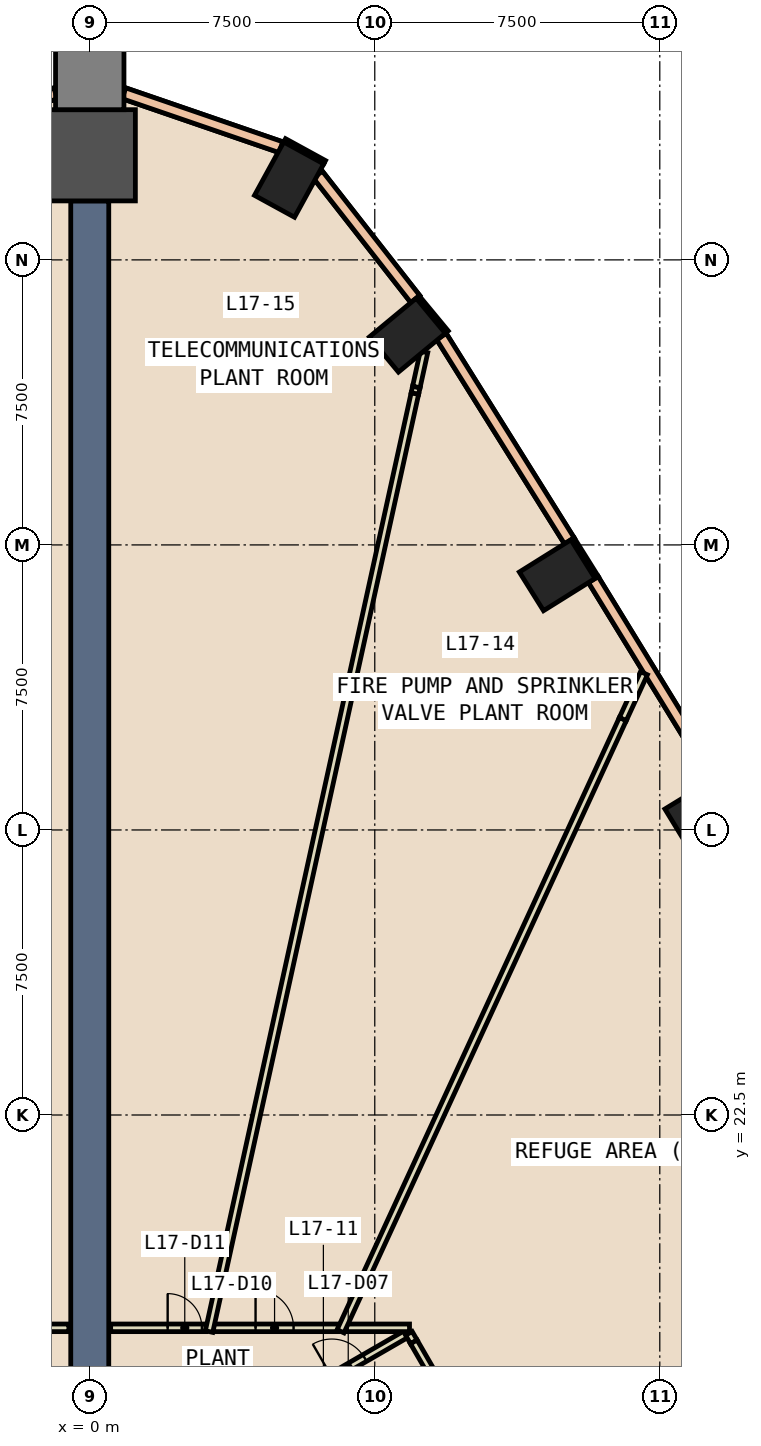
"""IFC4 building model, lengths in metres.
Left out: names, types, materials, properties, quantities, classifications, styles, units other than length and angle.
Written with IfcOpenShell. Run it as: python <this file> out.ifc"""

import sys

from ifc_helpers import new_model, si_unit, direction, frame, frame_2d, origin, origin_2d, place, context, subcontext, project, spatial, rectangle, extrude, element, fill, save


model = new_model("IFC4")
c1 = context("Model", 3, precision=1e-05, world=origin(), true_north=direction((0.0, 1.0)))
c2 = subcontext(c1, "Body", "Model", "MODEL_VIEW")
j1 = project(units=[si_unit("LENGTHUNIT", "METRE"), si_unit("PLANEANGLEUNIT", "RADIAN")], contexts=[c1])
p1 = place(None, origin())
s1 = spatial("IfcSite", under=j1, at=p1, CompositionType="ELEMENT")
p2 = place(p1, origin())
s2 = spatial("IfcBuilding", under=s1, at=p2, CompositionType="ELEMENT")
p3 = place(p2, frame((0.0, 0.0, 81.2)))
s3 = spatial("IfcBuildingStorey", under=s2, at=p3, CompositionType="ELEMENT", Elevation=81.2)
for number, where, z_axis, x_axis in (
    (1, (16.13, 30.457, -0.6), (0.0, 0.0, 1.0), (-0.522, 0.853, 0.0)),
    (2, (12.301, 36.702, -0.6), (0.0, 0.0, 1.0), (-0.53, 0.848, 0.0)),
    (3, (8.357, 43.02, -0.6), (0.0, 0.0, 1.0), (-0.638, 0.77, 0.0)),
    (4, (5.246, 47.112, -0.6), (0.0, 0.0, 1.0), (-0.877, 0.48, 0.0)),
):
    element("IfcColumn", number, at=place(p3, frame(where, z_axis=z_axis, x_axis=x_axis)), inside=s3, PredefinedType="COLUMN", context=c2, shape_type="SweptSolid", body=[
        extrude(rectangle(XDim=1.2, YDim=1.6, at=origin_2d()), origin(), (0.0, 0.0, 1.0), 5.4),
    ])
p4 = place(p3, frame((0.0, 47.752, -0.6), z_axis=(0.0, 0.0, 1.0), x_axis=(0.0, 1.0, 0.0)))
e5 = element("IfcColumn", 5, at=p4, inside=s3, PredefinedType="COLUMN", context=c2, shape_type="SweptSolid", body=[
    extrude(rectangle(XDim=2.4, YDim=2.4, at=origin_2d()), origin(), (0.0, 0.0, 1.0), 5.4),
])
p5 = place(p3, frame((0.0, 49.852, -0.6), z_axis=(0.0, 0.0, 1.0), x_axis=(0.0, 1.0, 0.0)))
e6 = element("IfcColumn", 6, at=p5, inside=s3, PredefinedType="COLUMN", context=c2, shape_type="SweptSolid", body=[
    extrude(rectangle(XDim=1.8, YDim=1.8, at=origin_2d()), origin(), (0.0, 0.0, 1.0), 5.4),
])
p6 = place(p3, frame((0.0, 14.5, 0.0), z_axis=(0.0, 0.0, 1.0), x_axis=(0.0, 1.0, 0.0)))
e7 = element("IfcWall", 7, at=p6, inside=s3, PredefinedType="SHEAR", context=c2, shape_type="SweptSolid", body=[
    extrude(rectangle(XDim=32.052, YDim=1.0, at=frame_2d((16.026, 0.0))), origin(), (0.0, 0.0, 1.0), 4.8),
])
p7 = place(p3, frame((6.18, 47.569, 0.0), z_axis=(0.0, 0.0, 1.0), x_axis=(-0.877155474831, 0.480206489934, 0.0)))
e8 = element("IfcWall", 8, at=p7, inside=s3, PredefinedType="STANDARD", context=c2, shape_type="SweptSolid", body=[
    extrude(rectangle(XDim=1.199, YDim=0.1, at=frame_2d((0.6, 0.0))), origin(), (0.0, 0.0, 1.0), 4.8),
])
for number, where, z_axis, x_axis in (
    (9, (13.34, 36.644, 0.0), (0.0, 0.0, 1.0), (-0.53, 0.848, 0.0)),
    (10, (9.394, 43.1, 0.0), (0.0, 0.0, 1.0), (-0.638, 0.77, 0.0)),
):
    element("IfcWall", number, at=place(p3, frame(where, z_axis=z_axis, x_axis=x_axis)), inside=s3, PredefinedType="STANDARD", context=c2, shape_type="SweptSolid", body=[
        extrude(rectangle(XDim=1.199, YDim=0.1, at=frame_2d((0.6, 0.0))), origin(), (0.0, 0.0, 1.0), 4.8),
    ])
p8 = place(p3, frame((16.457, 31.358, 0.0), z_axis=(0.0, 0.0, 1.0), x_axis=(-0.522658154315, 0.852542347176, 0.0)))
e11 = element("IfcWall", 11, at=p8, inside=s3, PredefinedType="STANDARD", context=c2, shape_type="SweptSolid", body=[
    extrude(rectangle(XDim=6.136, YDim=0.3, at=frame_2d((3.068, 0.0))), origin(), (0.0, 0.0, 1.0), 1.2),
])
p9 = place(p3, frame((16.457, 31.358, 4.0), z_axis=(0.0, 0.0, 1.0), x_axis=(-0.522658154315, 0.852542347176, 0.0)))
e12 = element("IfcWall", 12, at=p9, inside=s3, PredefinedType="STANDARD", context=c2, shape_type="SweptSolid", body=[
    extrude(rectangle(XDim=6.136, YDim=0.3, at=frame_2d((3.068, 0.0))), origin(), (0.0, 0.0, 1.0), 0.8),
])
p10 = place(p3, frame((12.619, 37.607, 0.0), z_axis=(0.0, 0.0, 1.0), x_axis=(-0.530410515419, 0.847740930434, 0.0)))
e13 = element("IfcWall", 13, at=p10, inside=s3, PredefinedType="STANDARD", context=c2, shape_type="SweptSolid", body=[
    extrude(rectangle(XDim=6.344, YDim=0.3, at=frame_2d((3.172, 0.0))), origin(), (0.0, 0.0, 1.0), 1.2),
])
p11 = place(p3, frame((12.619, 37.607, 4.0), z_axis=(0.0, 0.0, 1.0), x_axis=(-0.530410515419, 0.847740930434, 0.0)))
e14 = element("IfcWall", 14, at=p11, inside=s3, PredefinedType="STANDARD", context=c2, shape_type="SweptSolid", body=[
    extrude(rectangle(XDim=6.344, YDim=0.3, at=frame_2d((3.172, 0.0))), origin(), (0.0, 0.0, 1.0), 0.8),
])
p12 = place(p3, frame((8.565, 43.97, 0.0), z_axis=(0.0, 0.0, 1.0), x_axis=(-0.616571010777, 0.787299300564, 0.0)))
e15 = element("IfcWall", 15, at=p12, inside=s3, PredefinedType="STANDARD", context=c2, shape_type="SweptSolid", body=[
    extrude(rectangle(XDim=4.158, YDim=0.3, at=frame_2d((2.079, 0.0))), origin(), (0.0, 0.0, 1.0), 1.2),
])
p13 = place(p3, frame((8.565, 43.97, 4.0), z_axis=(0.0, 0.0, 1.0), x_axis=(-0.616571010777, 0.787299300564, 0.0)))
e16 = element("IfcWall", 16, at=p13, inside=s3, PredefinedType="STANDARD", context=c2, shape_type="SweptSolid", body=[
    extrude(rectangle(XDim=4.158, YDim=0.3, at=frame_2d((2.079, 0.0))), origin(), (0.0, 0.0, 1.0), 0.8),
])
p14 = place(p3, frame((5.03, 47.965, 0.0), z_axis=(0.0, 0.0, 1.0), x_axis=(-0.945765505039, 0.324850133874, 0.0)))
e17 = element("IfcWall", 17, at=p14, inside=s3, PredefinedType="STANDARD", context=c2, shape_type="SweptSolid", body=[
    extrude(rectangle(XDim=4.368, YDim=0.3, at=frame_2d((2.184, 0.0))), origin(), (0.0, 0.0, 1.0), 1.2),
])
p15 = place(p3, frame((5.03, 47.965, 4.0), z_axis=(0.0, 0.0, 1.0), x_axis=(-0.945765505039, 0.324850133874, 0.0)))
e18 = element("IfcWall", 18, at=p15, inside=s3, PredefinedType="STANDARD", context=c2, shape_type="SweptSolid", body=[
    extrude(rectangle(XDim=4.368, YDim=0.3, at=frame_2d((2.184, 0.0))), origin(), (0.0, 0.0, 1.0), 0.8),
])
p16 = place(p3, frame((-0.899, 49.384, 0.0), z_axis=(0.0, 0.0, 1.0), x_axis=(-0.945765505039, -0.324850133874, 0.0)))
e19 = element("IfcWall", 19, at=p16, inside=s3, PredefinedType="STANDARD", context=c2, shape_type="SweptSolid", body=[
    extrude(rectangle(XDim=4.368, YDim=0.3, at=frame_2d((2.184, 0.0))), origin(), (0.0, 0.0, 1.0), 1.2),
])
p17 = place(p3, frame((-0.899, 49.384, 4.0), z_axis=(0.0, 0.0, 1.0), x_axis=(-0.945765505039, -0.324850133874, 0.0)))
e20 = element("IfcWall", 20, at=p17, inside=s3, PredefinedType="STANDARD", context=c2, shape_type="SweptSolid", body=[
    extrude(rectangle(XDim=4.368, YDim=0.3, at=frame_2d((2.184, 0.0))), origin(), (0.0, 0.0, 1.0), 0.8),
])
p18 = place(p3, frame((6.223, 15.521, 0.0), z_axis=(0.0, 0.0, 1.0), x_axis=(0.866022959057, 0.500004234368, 0.0)))
e21 = element("IfcWall", 21, at=p18, inside=s3, PredefinedType="PARTITIONING", context=c2, shape_type="SweptSolid", body=[
    extrude(rectangle(XDim=2.5, YDim=0.2, at=frame_2d((1.25, 0.0))), origin(), (0.0, 0.0, 1.0), 4.8),
])
p19 = place(p18, frame((0.168, 0.0, 0.0)))
e22 = element("IfcOpeningElement", 22, at=p19, cuts=e21, PredefinedType="OPENING", context=c2, shape_type="SweptSolid", body=[
    extrude(rectangle(XDim=1.0, YDim=2.1, at=frame_2d((0.5, 1.05))), frame((0.0, 0.11, 0.0), z_axis=(0.0, -1.0, 0.0), x_axis=(1.0, 0.0, 0.0)), (0.0, 0.0, 1.0), 0.22),
])
p20 = place(p3, frame((8.398, 16.754, 0.0), z_axis=(0.0, 0.0, 1.0), x_axis=(0.499695194987, -0.866201311536, 0.0)))
e23 = element("IfcWall", 23, at=p20, inside=s3, PredefinedType="PARTITIONING", context=c2, shape_type="SweptSolid", body=[
    extrude(rectangle(XDim=0.259, YDim=0.2, at=frame_2d((0.129, 0.0))), origin(), (0.0, 0.0, 1.0), 4.8),
])
p21 = place(p3, frame((6.741, 16.9, 0.0), z_axis=(0.0, 0.0, 1.0), x_axis=(1.0, 0.0, 0.0)))
e24 = element("IfcWall", 24, at=p21, inside=s3, PredefinedType="PARTITIONING", context=c2, shape_type="SweptSolid", body=[
    extrude(rectangle(XDim=1.673, YDim=0.2, at=frame_2d((0.836, 0.0))), origin(), (0.0, 0.0, 1.0), 4.8),
])
p22 = place(p3, frame((3.26, 16.9, 0.0), z_axis=(0.0, 0.0, 1.0), x_axis=(1.0, 0.0, 0.0)))
e25 = element("IfcWall", 25, at=p22, inside=s3, PredefinedType="PARTITIONING", context=c2, shape_type="SweptSolid", body=[
    extrude(rectangle(XDim=3.281, YDim=0.2, at=frame_2d((1.641, 0.0))), origin(), (0.0, 0.0, 1.0), 4.8),
])
p23 = place(p22, frame((1.103, 0.0, 0.0)))
e26 = element("IfcOpeningElement", 26, at=p23, cuts=e25, PredefinedType="OPENING", context=c2, shape_type="SweptSolid", body=[
    extrude(rectangle(XDim=1.0, YDim=2.1, at=frame_2d((0.5, 1.05))), frame((0.0, 0.11, 0.0), z_axis=(0.0, -1.0, 0.0), x_axis=(1.0, 0.0, 0.0)), (0.0, 0.0, 1.0), 0.22),
])
p24 = place(p3, frame((0.55, 16.9, 0.0), z_axis=(0.0, 0.0, 1.0), x_axis=(1.0, 0.0, 0.0)))
e27 = element("IfcWall", 27, at=p24, inside=s3, PredefinedType="PARTITIONING", context=c2, shape_type="SweptSolid", body=[
    extrude(rectangle(XDim=2.51, YDim=0.2, at=frame_2d((1.255, 0.0))), origin(), (0.0, 0.0, 1.0), 4.8),
])
p25 = place(p24, frame((1.5, 0.0, 0.0)))
e28 = element("IfcOpeningElement", 28, at=p25, cuts=e27, PredefinedType="OPENING", context=c2, shape_type="SweptSolid", body=[
    extrude(rectangle(XDim=0.9, YDim=2.1, at=frame_2d((0.45, 1.05))), frame((0.0, 0.11, 0.0), z_axis=(0.0, -1.0, 0.0), x_axis=(1.0, 0.0, 0.0)), (0.0, 0.0, 1.0), 0.22),
])
p26 = place(p3, frame((6.599, 16.809, 0.0), z_axis=(0.0, 0.0, 1.0), x_axis=(0.418762306906, 0.908095881675, 0.0)))
e29 = element("IfcWall", 29, at=p26, inside=s3, PredefinedType="PARTITIONING", context=c2, shape_type="SweptSolid", body=[
    extrude(rectangle(XDim=17.74, YDim=0.2, at=frame_2d((8.87, 0.0))), origin(), (0.0, 0.0, 1.0), 4.8),
])
p27 = place(p3, frame((3.139, 16.802, 0.0), z_axis=(0.0, 0.0, 1.0), x_axis=(0.214360085787, 0.97675470494, 0.0)))
e30 = element("IfcWall", 30, at=p27, inside=s3, PredefinedType="PARTITIONING", context=c2, shape_type="SweptSolid", body=[
    extrude(rectangle(XDim=25.271, YDim=0.2, at=frame_2d((12.635, 0.0))), origin(), (0.0, 0.0, 1.0), 2.3),
])
p28 = place(p3, frame((0.0, 48.972, 0.0), z_axis=(0.0, 0.0, 1.0), x_axis=(0.0, 1.0, 0.0)))
e31 = element("IfcWall", 31, at=p28, inside=s3, PredefinedType="PARTITIONING", context=c2, shape_type="SweptSolid", body=[
    extrude(rectangle(XDim=0.499, YDim=0.2, at=frame_2d((0.25, 0.0))), origin(), (0.0, 0.0, 1.0), 4.8),
])
p29 = place(p3, frame((8.527, 16.53, 0.0), z_axis=(0.0, 0.0, 1.0), x_axis=(0.499893495202, -0.866086885627, 0.0)))
e32 = element("IfcWall", 32, at=p29, inside=s3, PredefinedType="PARTITIONING", context=c2, shape_type="SweptSolid", body=[
    extrude(rectangle(XDim=1.112, YDim=0.2, at=frame_2d((0.556, 0.0))), origin(), (0.0, 0.0, 1.0), 2.4),
])
p30 = place(p3, frame((22.198, 19.375, 0.0), z_axis=(0.0, 0.0, 1.0), x_axis=(-0.796086524029, -0.605182820526, 0.0)))
e33 = element("IfcWall", 33, at=p30, inside=s3, PredefinedType="PARTITIONING", context=c2, shape_type="SweptSolid", body=[
    extrude(rectangle(XDim=13.368, YDim=0.2, at=frame_2d((6.684, 0.0))), origin(), (0.0, 0.0, 1.0), 4.8),
])
p31 = place(p3, frame((14.028, 32.919, 0.0), z_axis=(0.0, 0.0, 1.0), x_axis=(0.418603457455, 0.908169117184, 0.0)))
e34 = element("IfcWall", 34, at=p31, inside=s3, PredefinedType="PARTITIONING", context=c2, shape_type="SweptSolid", body=[
    extrude(rectangle(XDim=1.328, YDim=0.2, at=frame_2d((0.664, 0.0))), origin(), (0.0, 0.0, 1.0), 2.4),
])
p32 = place(p3, frame((8.556, 41.485, 0.0), z_axis=(0.0, 0.0, 1.0), x_axis=(0.2175209728, 0.97605564718, 0.0)))
e35 = element("IfcWall", 35, at=p32, inside=s3, PredefinedType="PARTITIONING", context=c2, shape_type="SweptSolid", body=[
    extrude(rectangle(XDim=0.175, YDim=0.2, at=frame_2d((0.087, 0.0))), origin(), (0.0, 0.0, 1.0), 4.8),
])
p33 = place(p3, frame((8.594, 41.656, 0.0), z_axis=(0.0, 0.0, 1.0), x_axis=(0.213673762505, 0.9769050738, 0.0)))
e36 = element("IfcWall", 36, at=p33, inside=s3, PredefinedType="PARTITIONING", context=c2, shape_type="SweptSolid", body=[
    extrude(rectangle(XDim=0.945, YDim=0.2, at=frame_2d((0.472, 0.0))), origin(), (0.0, 0.0, 1.0), 2.3),
])
p34 = place(p3, frame((-1.075, 16.9, 0.0), z_axis=(0.0, 0.0, 1.0), x_axis=(1.0, 0.0, 0.0)))
e37 = element("IfcWall", 37, at=p34, inside=s3, PredefinedType="PARTITIONING", context=c2, shape_type="SweptSolid", body=[
    extrude(rectangle(XDim=0.525, YDim=0.2, at=frame_2d((0.262, 0.0))), origin(), (0.0, 0.0, 1.0), 4.8),
])
p35 = place(p19, origin())
e38 = element("IfcDoor", 38, at=p35, inside=s3, OperationType="SINGLE_SWING_LEFT", PredefinedType="DOOR", context=c2, shape_type="SweptSolid", body=[
    extrude(rectangle(XDim=1.0, YDim=2.1, at=frame_2d((0.5, 1.05))), frame((0.0, 0.025, 0.0), z_axis=(0.0, -1.0, 0.0), x_axis=(1.0, 0.0, 0.0)), (0.0, 0.0, 1.0), 0.05),
])
fill(e22, e38)
p36 = place(p23, origin())
e39 = element("IfcDoor", 39, at=p36, inside=s3, OperationType="SINGLE_SWING_RIGHT", PredefinedType="DOOR", context=c2, shape_type="SweptSolid", body=[
    extrude(rectangle(XDim=1.0, YDim=2.1, at=frame_2d((0.5, 1.05))), frame((0.0, 0.025, 0.0), z_axis=(0.0, -1.0, 0.0), x_axis=(1.0, 0.0, 0.0)), (0.0, 0.0, 1.0), 0.05),
])
fill(e26, e39)
p37 = place(p25, origin())
e40 = element("IfcDoor", 40, at=p37, inside=s3, OperationType="SINGLE_SWING_LEFT", PredefinedType="DOOR", context=c2, shape_type="SweptSolid", body=[
    extrude(rectangle(XDim=0.9, YDim=2.1, at=frame_2d((0.45, 1.05))), frame((0.0, 0.025, 0.0), z_axis=(0.0, -1.0, 0.0), x_axis=(1.0, 0.0, 0.0)), (0.0, 0.0, 1.0), 0.05),
])
fill(e28, e40)
save(model, sys.argv[1])
